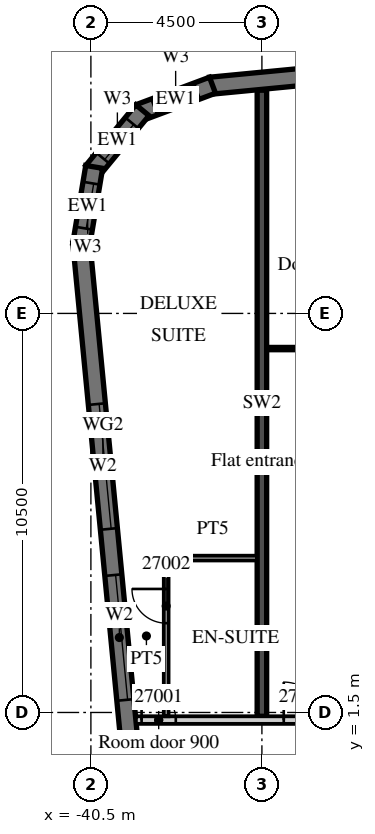
"""IFC4 building model, lengths in metres.
Left out: names, types, materials, properties, quantities, classifications, styles, units other than length and angle.
Written with IfcOpenShell. Run it as: python <this file> out.ifc"""

import sys

from ifc_helpers import new_model, si_unit, direction, frame, frame_2d, origin, place, context, subcontext, project, spatial, polyline, rectangle, outline, extrude, element, fill, save


model = new_model("IFC4")
c1 = context("Model", 3, precision=1e-05, world=origin(), true_north=direction((0.0, 1.0)))
c2 = subcontext(c1, "Body", "Model", "MODEL_VIEW")
j1 = project(units=[si_unit("LENGTHUNIT", "METRE"), si_unit("PLANEANGLEUNIT", "RADIAN")], contexts=[c1])
p1 = place(None, origin())
s1 = spatial("IfcSite", under=j1, at=p1, CompositionType="ELEMENT")
p2 = place(p1, origin())
s2 = spatial("IfcBuilding", under=s1, at=p2, CompositionType="ELEMENT")
p3 = place(p2, frame((0.0, 0.0, 124.0)))
s3 = spatial("IfcBuildingStorey", under=s2, at=p3, CompositionType="ELEMENT", Elevation=124.0)
p4 = place(p3, frame((-36.0, 1.4, 0.0), z_axis=(0.0, 0.0, 1.0), x_axis=(0.0, 1.0, 0.0)))
e1 = element("IfcWall", 1, at=p4, inside=s3, PredefinedType="SHEAR", context=c2, shape_type="SweptSolid", body=[
    extrude(rectangle(XDim=16.474, YDim=0.25, at=frame_2d((8.237, 0.0))), origin(), (0.0, 0.0, 1.0), 3.3),
])
p5 = place(p3, frame((-40.753, 13.872, 0.0), z_axis=(0.0, 0.0, 1.0), x_axis=(0.095843327381, -0.995396431878, 0.0)))
e2 = element("IfcWall", 2, at=p5, inside=s3, PredefinedType="SOLIDWALL", context=c2, shape_type="SweptSolid", body=[
    extrude(rectangle(XDim=35.0, YDim=0.45, at=frame_2d((17.5, 0.0))), origin(), (0.0, 0.0, 1.0), 3.02),
])
p6 = place(p5, frame((4.277, 0.0, 0.45)))
e3 = element("IfcOpeningElement", 3, at=p6, cuts=e2, PredefinedType="OPENING", context=c2, shape_type="SweptSolid", body=[
    extrude(rectangle(XDim=3.3, YDim=2.25, at=frame_2d((1.65, 1.125))), frame((0.0, 0.235, 0.0), z_axis=(0.0, -1.0, 0.0), x_axis=(1.0, 0.0, 0.0)), (0.0, 0.0, 1.0), 0.47),
])
p7 = place(p5, frame((8.798, 0.0, 0.45)))
e4 = element("IfcOpeningElement", 4, at=p7, cuts=e2, PredefinedType="OPENING", context=c2, shape_type="SweptSolid", body=[
    extrude(rectangle(XDim=3.3, YDim=2.25, at=frame_2d((1.65, 1.125))), frame((0.0, 0.235, 0.0), z_axis=(0.0, -1.0, 0.0), x_axis=(1.0, 0.0, 0.0)), (0.0, 0.0, 1.0), 0.47),
])
p8 = place(p3, frame((13.521, 22.89, 0.0), z_axis=(0.0, 0.0, 1.0), x_axis=(-0.995396445054, -0.095843190545, 0.0)))
e5 = element("IfcWall", 5, at=p8, inside=s3, PredefinedType="SOLIDWALL", context=c2, shape_type="SweptSolid", body=[
    extrude(rectangle(XDim=51.114, YDim=0.45, at=frame_2d((25.557, 0.0))), origin(), (0.0, 0.0, 1.0), 3.02),
])
p9 = place(p8, frame((0.91, 0.0, 0.45)))
e6 = element("IfcOpeningElement", 6, at=p9, cuts=e5, PredefinedType="OPENING", context=c2, shape_type="SweptSolid", body=[
    extrude(rectangle(XDim=2.7, YDim=2.25, at=frame_2d((1.35, 1.125))), frame((0.0, 0.235, 0.0), z_axis=(0.0, -1.0, 0.0), x_axis=(1.0, 0.0, 0.0)), (0.0, 0.0, 1.0), 0.47),
])
p10 = place(p8, frame((5.431, 0.0, 0.45)))
e7 = element("IfcOpeningElement", 7, at=p10, cuts=e5, PredefinedType="OPENING", context=c2, shape_type="SweptSolid", body=[
    extrude(rectangle(XDim=2.7, YDim=2.25, at=frame_2d((1.35, 1.125))), frame((0.0, 0.235, 0.0), z_axis=(0.0, -1.0, 0.0), x_axis=(1.0, 0.0, 0.0)), (0.0, 0.0, 1.0), 0.47),
])
p11 = place(p8, frame((9.952, 0.0, 0.45)))
e8 = element("IfcOpeningElement", 8, at=p11, cuts=e5, PredefinedType="OPENING", context=c2, shape_type="SweptSolid", body=[
    extrude(rectangle(XDim=2.7, YDim=2.25, at=frame_2d((1.35, 1.125))), frame((0.0, 0.235, 0.0), z_axis=(0.0, -1.0, 0.0), x_axis=(1.0, 0.0, 0.0)), (0.0, 0.0, 1.0), 0.47),
])
p12 = place(p8, frame((14.473, 0.0, 0.45)))
e9 = element("IfcOpeningElement", 9, at=p12, cuts=e5, PredefinedType="OPENING", context=c2, shape_type="SweptSolid", body=[
    extrude(rectangle(XDim=2.7, YDim=2.25, at=frame_2d((1.35, 1.125))), frame((0.0, 0.235, 0.0), z_axis=(0.0, -1.0, 0.0), x_axis=(1.0, 0.0, 0.0)), (0.0, 0.0, 1.0), 0.47),
])
p13 = place(p8, frame((18.994, 0.0, 0.45)))
e10 = element("IfcOpeningElement", 10, at=p13, cuts=e5, PredefinedType="OPENING", context=c2, shape_type="SweptSolid", body=[
    extrude(rectangle(XDim=2.7, YDim=2.25, at=frame_2d((1.35, 1.125))), frame((0.0, 0.235, 0.0), z_axis=(0.0, -1.0, 0.0), x_axis=(1.0, 0.0, 0.0)), (0.0, 0.0, 1.0), 0.47),
])
p14 = place(p8, frame((23.514, 0.0, 0.45)))
e11 = element("IfcOpeningElement", 11, at=p14, cuts=e5, PredefinedType="OPENING", context=c2, shape_type="SweptSolid", body=[
    extrude(rectangle(XDim=2.7, YDim=2.25, at=frame_2d((1.35, 1.125))), frame((0.0, 0.235, 0.0), z_axis=(0.0, -1.0, 0.0), x_axis=(1.0, 0.0, 0.0)), (0.0, 0.0, 1.0), 0.47),
])
p15 = place(p8, frame((28.035, 0.0, 0.45)))
e12 = element("IfcOpeningElement", 12, at=p15, cuts=e5, PredefinedType="OPENING", context=c2, shape_type="SweptSolid", body=[
    extrude(rectangle(XDim=2.7, YDim=2.25, at=frame_2d((1.35, 1.125))), frame((0.0, 0.235, 0.0), z_axis=(0.0, -1.0, 0.0), x_axis=(1.0, 0.0, 0.0)), (0.0, 0.0, 1.0), 0.47),
])
p16 = place(p8, frame((32.556, 0.0, 0.45)))
e13 = element("IfcOpeningElement", 13, at=p16, cuts=e5, PredefinedType="OPENING", context=c2, shape_type="SweptSolid", body=[
    extrude(rectangle(XDim=2.7, YDim=2.25, at=frame_2d((1.35, 1.125))), frame((0.0, 0.235, 0.0), z_axis=(0.0, -1.0, 0.0), x_axis=(1.0, 0.0, 0.0)), (0.0, 0.0, 1.0), 0.47),
])
p17 = place(p8, frame((37.077, 0.0, 0.45)))
e14 = element("IfcOpeningElement", 14, at=p17, cuts=e5, PredefinedType="OPENING", context=c2, shape_type="SweptSolid", body=[
    extrude(rectangle(XDim=2.7, YDim=2.25, at=frame_2d((1.35, 1.125))), frame((0.0, 0.235, 0.0), z_axis=(0.0, -1.0, 0.0), x_axis=(1.0, 0.0, 0.0)), (0.0, 0.0, 1.0), 0.47),
])
p18 = place(p8, frame((41.598, 0.0, 0.45)))
e15 = element("IfcOpeningElement", 15, at=p18, cuts=e5, PredefinedType="OPENING", context=c2, shape_type="SweptSolid", body=[
    extrude(rectangle(XDim=2.7, YDim=2.25, at=frame_2d((1.35, 1.125))), frame((0.0, 0.235, 0.0), z_axis=(0.0, -1.0, 0.0), x_axis=(1.0, 0.0, 0.0)), (0.0, 0.0, 1.0), 0.47),
])
p19 = place(p8, frame((46.118, 0.0, 0.45)))
e16 = element("IfcOpeningElement", 16, at=p19, cuts=e5, PredefinedType="OPENING", context=c2, shape_type="SweptSolid", body=[
    extrude(rectangle(XDim=2.7, YDim=2.25, at=frame_2d((1.35, 1.125))), frame((0.0, 0.235, 0.0), z_axis=(0.0, -1.0, 0.0), x_axis=(1.0, 0.0, 0.0)), (0.0, 0.0, 1.0), 0.47),
])
p20 = place(p3, frame((-37.3, 18.004, 0.0), z_axis=(0.0, 0.0, 1.0), x_axis=(-0.936677599948, -0.350192909346, 0.0)))
e17 = element("IfcWall", 17, at=p20, inside=s3, PredefinedType="SOLIDWALL", context=c2, shape_type="SweptSolid", body=[
    extrude(outline(polyline([(0.0, -0.225), (2.071, -0.225), (1.95, 0.225), (0.121, 0.225), (0.0, -0.225)])), origin(), (0.0, 0.0, 1.0), 3.02),
])
p21 = place(p20, frame((0.435, 0.0, 0.45)))
e18 = element("IfcOpeningElement", 18, at=p21, cuts=e17, PredefinedType="OPENING", context=c2, shape_type="SweptSolid", body=[
    extrude(rectangle(XDim=1.2, YDim=2.25, at=frame_2d((0.6, 1.125))), frame((0.0, 0.235, 0.0), z_axis=(0.0, -1.0, 0.0), x_axis=(1.0, 0.0, 0.0)), (0.0, 0.0, 1.0), 0.47),
])
p22 = place(p3, frame((-39.145, 17.347, 0.0), z_axis=(0.0, 0.0, 1.0), x_axis=(-0.636046112757, -0.771651049663, 0.0)))
e19 = element("IfcWall", 19, at=p22, inside=s3, PredefinedType="SOLIDWALL", context=c2, shape_type="SweptSolid", body=[
    extrude(outline(polyline([(0.0, -0.225), (2.071, -0.225), (1.95, 0.225), (0.121, 0.225), (0.0, -0.225)])), origin(), (0.0, 0.0, 1.0), 3.02),
])
p23 = place(p22, frame((0.435, 0.0, 0.45)))
e20 = element("IfcOpeningElement", 20, at=p23, cuts=e19, PredefinedType="OPENING", context=c2, shape_type="SweptSolid", body=[
    extrude(rectangle(XDim=1.2, YDim=2.25, at=frame_2d((0.6, 1.125))), frame((0.0, 0.235, 0.0), z_axis=(0.0, -1.0, 0.0), x_axis=(1.0, 0.0, 0.0)), (0.0, 0.0, 1.0), 0.47),
])
p24 = place(p3, frame((-40.413, 15.855, 0.0), z_axis=(0.0, 0.0, 1.0), x_axis=(-0.165068144653, -0.986282164302, 0.0)))
e21 = element("IfcWall", 21, at=p24, inside=s3, PredefinedType="SOLIDWALL", context=c2, shape_type="SweptSolid", body=[
    extrude(outline(polyline([(0.0, -0.225), (2.071, -0.225), (1.95, 0.225), (0.121, 0.225), (0.0, -0.225)])), origin(), (0.0, 0.0, 1.0), 3.02),
])
p25 = place(p24, frame((0.435, 0.0, 0.45)))
e22 = element("IfcOpeningElement", 22, at=p25, cuts=e21, PredefinedType="OPENING", context=c2, shape_type="SweptSolid", body=[
    extrude(rectangle(XDim=1.2, YDim=2.25, at=frame_2d((0.6, 1.125))), frame((0.0, 0.235, 0.0), z_axis=(0.0, -1.0, 0.0), x_axis=(1.0, 0.0, 0.0)), (0.0, 0.0, 1.0), 0.47),
])
p26 = place(p3, frame((-39.316, 1.3, 0.0), z_axis=(0.0, 0.0, 1.0), x_axis=(1.0, 0.0, 0.0)))
e23 = element("IfcWall", 23, at=p26, inside=s3, PredefinedType="PARTITIONING", context=c2, shape_type="SweptSolid", body=[
    extrude(rectangle(XDim=52.816, YDim=0.2, at=frame_2d((26.408, 0.0))), origin(), (0.0, 0.0, 1.0), 3.02),
])
p27 = place(p26, frame((0.15, 0.0, 0.0)))
e24 = element("IfcOpeningElement", 24, at=p27, cuts=e23, PredefinedType="OPENING", context=c2, shape_type="SweptSolid", body=[
    extrude(rectangle(XDim=0.9, YDim=2.1, at=frame_2d((0.45, 1.05))), frame((0.0, 0.11, 0.0), z_axis=(0.0, -1.0, 0.0), x_axis=(1.0, 0.0, 0.0)), (0.0, 0.0, 1.0), 0.22),
])
p28 = place(p26, frame((3.891, 0.0, 0.0)))
e25 = element("IfcOpeningElement", 25, at=p28, cuts=e23, PredefinedType="OPENING", context=c2, shape_type="SweptSolid", body=[
    extrude(rectangle(XDim=1.0, YDim=2.1, at=frame_2d((0.5, 1.05))), frame((0.0, 0.11, 0.0), z_axis=(0.0, -1.0, 0.0), x_axis=(1.0, 0.0, 0.0)), (0.0, 0.0, 1.0), 0.22),
])
p29 = place(p26, frame((10.741, 0.0, 0.0)))
e26 = element("IfcOpeningElement", 26, at=p29, cuts=e23, PredefinedType="OPENING", context=c2, shape_type="SweptSolid", body=[
    extrude(rectangle(XDim=1.0, YDim=2.1, at=frame_2d((0.5, 1.05))), frame((0.0, 0.11, 0.0), z_axis=(0.0, -1.0, 0.0), x_axis=(1.0, 0.0, 0.0)), (0.0, 0.0, 1.0), 0.22),
])
p30 = place(p26, frame((15.266, 0.0, 0.0)))
e27 = element("IfcOpeningElement", 27, at=p30, cuts=e23, PredefinedType="OPENING", context=c2, shape_type="SweptSolid", body=[
    extrude(rectangle(XDim=1.0, YDim=2.1, at=frame_2d((0.5, 1.05))), frame((0.0, 0.11, 0.0), z_axis=(0.0, -1.0, 0.0), x_axis=(1.0, 0.0, 0.0)), (0.0, 0.0, 1.0), 0.22),
])
p31 = place(p26, frame((19.741, 0.0, 0.0)))
e28 = element("IfcOpeningElement", 28, at=p31, cuts=e23, PredefinedType="OPENING", context=c2, shape_type="SweptSolid", body=[
    extrude(rectangle(XDim=1.0, YDim=2.1, at=frame_2d((0.5, 1.05))), frame((0.0, 0.11, 0.0), z_axis=(0.0, -1.0, 0.0), x_axis=(1.0, 0.0, 0.0)), (0.0, 0.0, 1.0), 0.22),
])
p32 = place(p26, frame((26.678, 0.0, 0.0)))
e29 = element("IfcOpeningElement", 29, at=p32, cuts=e23, PredefinedType="OPENING", context=c2, shape_type="SweptSolid", body=[
    extrude(rectangle(XDim=1.2, YDim=2.1, at=frame_2d((0.6, 1.05))), frame((0.0, 0.11, 0.0), z_axis=(0.0, -1.0, 0.0), x_axis=(1.0, 0.0, 0.0)), (0.0, 0.0, 1.0), 0.22),
])
p33 = place(p26, frame((35.678, 0.0, 0.0)))
e30 = element("IfcOpeningElement", 30, at=p33, cuts=e23, PredefinedType="OPENING", context=c2, shape_type="SweptSolid", body=[
    extrude(rectangle(XDim=1.2, YDim=2.1, at=frame_2d((0.6, 1.05))), frame((0.0, 0.11, 0.0), z_axis=(0.0, -1.0, 0.0), x_axis=(1.0, 0.0, 0.0)), (0.0, 0.0, 1.0), 0.22),
])
p34 = place(p26, frame((41.754, 0.0, 0.0)))
e31 = element("IfcOpeningElement", 31, at=p34, cuts=e23, PredefinedType="OPENING", context=c2, shape_type="SweptSolid", body=[
    extrude(rectangle(XDim=1.2, YDim=2.1, at=frame_2d((0.6, 1.05))), frame((0.0, 0.11, 0.0), z_axis=(0.0, -1.0, 0.0), x_axis=(1.0, 0.0, 0.0)), (0.0, 0.0, 1.0), 0.22),
])
p35 = place(p26, frame((51.241, 0.0, 0.0)))
e32 = element("IfcOpeningElement", 32, at=p35, cuts=e23, PredefinedType="OPENING", context=c2, shape_type="SweptSolid", body=[
    extrude(rectangle(XDim=1.0, YDim=2.1, at=frame_2d((0.5, 1.05))), frame((0.0, 0.11, 0.0), z_axis=(0.0, -1.0, 0.0), x_axis=(1.0, 0.0, 0.0)), (0.0, 0.0, 1.0), 0.22),
])
p36 = place(p3, frame((-38.519, 1.4, 0.0), z_axis=(0.0, 0.0, 1.0), x_axis=(0.0, 1.0, 0.0)))
e33 = element("IfcWall", 33, at=p36, inside=s3, PredefinedType="PARTITIONING", context=c2, shape_type="SweptSolid", body=[
    extrude(rectangle(XDim=4.225, YDim=0.125, at=frame_2d((2.113, 0.0))), origin(), (0.0, 0.0, 1.0), 3.02),
])
p37 = place(p36, frame((2.45, 0.0, 0.0)))
e34 = element("IfcOpeningElement", 34, at=p37, cuts=e33, PredefinedType="OPENING", context=c2, shape_type="SweptSolid", body=[
    extrude(rectangle(XDim=0.9, YDim=2.1, at=frame_2d((0.45, 1.05))), frame((0.0, 0.073, 0.0), z_axis=(0.0, -1.0, 0.0), x_axis=(1.0, 0.0, 0.0)), (0.0, 0.0, 1.0), 0.145),
])
p38 = place(p3, frame((-38.457, 5.562, 0.0), z_axis=(0.0, 0.0, 1.0), x_axis=(1.0, 0.0, 0.0)))
e35 = element("IfcWall", 35, at=p38, inside=s3, PredefinedType="PARTITIONING", context=c2, shape_type="SweptSolid", body=[
    extrude(rectangle(XDim=2.332, YDim=0.125, at=frame_2d((1.166, 0.0))), origin(), (0.0, 0.0, 1.0), 3.02),
])
p39 = place(p3, frame((-35.875, 11.075, 0.0), z_axis=(0.0, 0.0, 1.0), x_axis=(1.0, 0.0, 0.0)))
e36 = element("IfcWall", 36, at=p39, inside=s3, PredefinedType="PARTITIONING", context=c2, shape_type="SweptSolid", body=[
    extrude(rectangle(XDim=4.275, YDim=0.1, at=frame_2d((2.137, 0.0))), origin(), (0.0, 0.0, 1.0), 3.02),
])
p40 = place(p39, frame((1.388, 0.0, 0.0)))
e37 = element("IfcOpeningElement", 37, at=p40, cuts=e36, PredefinedType="OPENING", context=c2, shape_type="SweptSolid", body=[
    extrude(rectangle(XDim=1.5, YDim=2.1, at=frame_2d((0.75, 1.05))), frame((0.0, 0.06, 0.0), z_axis=(0.0, -1.0, 0.0), x_axis=(1.0, 0.0, 0.0)), (0.0, 0.0, 1.0), 0.12),
])
p41 = place(p6, origin())
e38 = element("IfcWindow", 38, at=p41, inside=s3, PartitioningType="SINGLE_PANEL", PredefinedType="WINDOW", context=c2, shape_type="SweptSolid", body=[
    extrude(rectangle(XDim=3.3, YDim=2.25, at=frame_2d((1.65, 1.125))), frame((0.0, 0.09, 0.0), z_axis=(0.0, -1.0, 0.0), x_axis=(1.0, 0.0, 0.0)), (0.0, 0.0, 1.0), 0.06),
])
fill(e3, e38)
p42 = place(p7, origin())
e39 = element("IfcWindow", 39, at=p42, inside=s3, PartitioningType="SINGLE_PANEL", PredefinedType="WINDOW", context=c2, shape_type="SweptSolid", body=[
    extrude(rectangle(XDim=3.3, YDim=2.25, at=frame_2d((1.65, 1.125))), frame((0.0, 0.09, 0.0), z_axis=(0.0, -1.0, 0.0), x_axis=(1.0, 0.0, 0.0)), (0.0, 0.0, 1.0), 0.06),
])
fill(e4, e39)
p43 = place(p21, origin())
e40 = element("IfcWindow", 40, at=p43, inside=s3, PartitioningType="SINGLE_PANEL", PredefinedType="WINDOW", context=c2, shape_type="SweptSolid", body=[
    extrude(rectangle(XDim=1.2, YDim=2.25, at=frame_2d((0.6, 1.125))), frame((0.0, 0.09, 0.0), z_axis=(0.0, -1.0, 0.0), x_axis=(1.0, 0.0, 0.0)), (0.0, 0.0, 1.0), 0.06),
])
fill(e18, e40)
p44 = place(p23, origin())
e41 = element("IfcWindow", 41, at=p44, inside=s3, PartitioningType="SINGLE_PANEL", PredefinedType="WINDOW", context=c2, shape_type="SweptSolid", body=[
    extrude(rectangle(XDim=1.2, YDim=2.25, at=frame_2d((0.6, 1.125))), frame((0.0, 0.09, 0.0), z_axis=(0.0, -1.0, 0.0), x_axis=(1.0, 0.0, 0.0)), (0.0, 0.0, 1.0), 0.06),
])
fill(e20, e41)
p45 = place(p25, origin())
e42 = element("IfcWindow", 42, at=p45, inside=s3, PartitioningType="SINGLE_PANEL", PredefinedType="WINDOW", context=c2, shape_type="SweptSolid", body=[
    extrude(rectangle(XDim=1.2, YDim=2.25, at=frame_2d((0.6, 1.125))), frame((0.0, 0.09, 0.0), z_axis=(0.0, -1.0, 0.0), x_axis=(1.0, 0.0, 0.0)), (0.0, 0.0, 1.0), 0.06),
])
fill(e22, e42)
p46 = place(p27, origin())
e43 = element("IfcDoor", 43, at=p46, inside=s3, OperationType="SINGLE_SWING_LEFT", PredefinedType="DOOR", context=c2, shape_type="SweptSolid", body=[
    extrude(rectangle(XDim=0.9, YDim=2.1, at=frame_2d((0.45, 1.05))), frame((0.0, 0.025, 0.0), z_axis=(0.0, -1.0, 0.0), x_axis=(1.0, 0.0, 0.0)), (0.0, 0.0, 1.0), 0.05),
])
fill(e24, e43)
p47 = place(p37, origin())
e44 = element("IfcDoor", 44, at=p47, inside=s3, OperationType="SINGLE_SWING_RIGHT", PredefinedType="DOOR", context=c2, shape_type="SweptSolid", body=[
    extrude(rectangle(XDim=0.9, YDim=2.1, at=frame_2d((0.45, 1.05))), frame((0.0, 0.025, 0.0), z_axis=(0.0, -1.0, 0.0), x_axis=(1.0, 0.0, 0.0)), (0.0, 0.0, 1.0), 0.05),
])
fill(e34, e44)
p48 = place(p28, origin())
e45 = element("IfcDoor", 45, at=p48, inside=s3, OperationType="SINGLE_SWING_LEFT", PredefinedType="DOOR", context=c2, shape_type="SweptSolid", body=[
    extrude(rectangle(XDim=1.0, YDim=2.1, at=frame_2d((0.5, 1.05))), frame((0.0, 0.025, 0.0), z_axis=(0.0, -1.0, 0.0), x_axis=(1.0, 0.0, 0.0)), (0.0, 0.0, 1.0), 0.05),
])
fill(e25, e45)
save(model, sys.argv[1])
